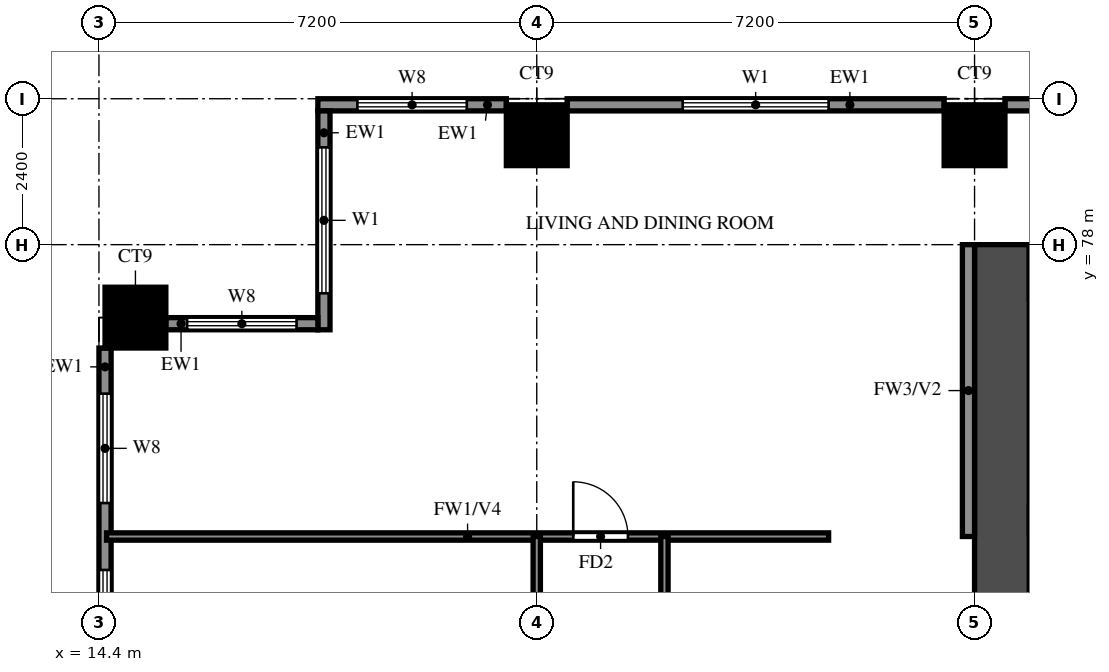
"""IFC4 building model, lengths in metres.
Left out: names, types, materials, properties, quantities, classifications, styles, units other than length and angle.
Written with IfcOpenShell. Run it as: python <this file> out.ifc"""

import sys

from ifc_helpers import new_model, si_unit, direction, frame, frame_2d, origin, origin_2d, place, context, subcontext, project, spatial, rectangle, extrude, source, transform, mapped, element, fill, save


model = new_model("IFC4")
c1 = context("Model", 3, precision=1e-05, world=origin(), true_north=direction((0.0, 1.0)))
c2 = subcontext(c1, "Body", "Model", "MODEL_VIEW")
j1 = project(units=[si_unit("LENGTHUNIT", "METRE"), si_unit("PLANEANGLEUNIT", "RADIAN")], contexts=[c1])
p1 = place(None, origin())
s1 = spatial("IfcSite", under=j1, at=p1, CompositionType="ELEMENT")
p2 = place(p1, origin())
s2 = spatial("IfcBuilding", under=s1, at=p2, CompositionType="ELEMENT")
p3 = place(p2, frame((0.0, 0.0, 90.0)))
s3 = spatial("IfcBuildingStorey", under=s2, at=p3, CompositionType="ELEMENT", Elevation=90.0)
m1 = source(origin(), c2, "Body", "SweptSolid", [
    extrude(rectangle(XDim=1.0, YDim=1.0, at=origin_2d()), origin(), (0.0, 0.0, 1.0), 3.18),
])
for number, where, z_axis, x_axis in (
    (1, (15.0, 76.8, 0.0), (0.0, 0.0, 1.0), (1.0, 0.0, 0.0)),
    (2, (21.6, 79.8, 0.0), (0.0, 0.0, 1.0), (1.0, 0.0, 0.0)),
    (3, (28.8, 79.8, 0.0), (0.0, 0.0, 1.0), (1.0, 0.0, 0.0)),
):
    element("IfcColumn", number, at=place(p3, frame(where, z_axis=z_axis, x_axis=x_axis)), inside=s3, PredefinedType="COLUMN", context=c2, shape_type="MappedRepresentation", body=[
        mapped(m1, transform((0.0, 0.0, 0.0))),
    ])
p4 = place(p3, frame((29.25, 66.0, 0.0), z_axis=(0.0, 0.0, 1.0), x_axis=(0.0, 1.0, 0.0)))
e4 = element("IfcWall", 4, at=p4, inside=s3, PredefinedType="SHEAR", context=c2, shape_type="SweptSolid", body=[
    extrude(rectangle(XDim=12.0, YDim=0.9, at=frame_2d((6.0, 0.0))), origin(), (0.0, 0.0, 1.0), 3.18),
])
p5 = place(p3, frame((29.7, 73.475, 0.0), z_axis=(0.0, 0.0, 1.0), x_axis=(1.0, 0.0, 0.0)))
e5 = element("IfcWall", 5, at=p5, inside=s3, PredefinedType="SHEAR", context=c2, shape_type="SweptSolid", body=[
    extrude(rectangle(XDim=3.175, YDim=0.45, at=frame_2d((1.587, 0.0))), origin(), (0.0, 0.0, 1.0), 3.18),
])
p6 = place(p3, frame((35.5, 80.3, 0.0), z_axis=(0.0, 0.0, 1.0), x_axis=(-1.0, 0.0, 0.0)))
e6 = element("IfcWall", 6, at=p6, inside=s3, PredefinedType="SOLIDWALL", context=c2, shape_type="SweptSolid", body=[
    extrude(rectangle(XDim=6.2, YDim=0.2, at=frame_2d((3.1, 0.0))), origin(), (0.0, 0.0, 1.0), 3.18),
])
p7 = place(p3, frame((28.3, 80.3, 0.0), z_axis=(0.0, 0.0, 1.0), x_axis=(-1.0, 0.0, 0.0)))
e7 = element("IfcWall", 7, at=p7, inside=s3, PredefinedType="SOLIDWALL", context=c2, shape_type="SweptSolid", body=[
    extrude(rectangle(XDim=6.2, YDim=0.2, at=frame_2d((3.1, 0.0))), origin(), (0.0, 0.0, 1.0), 3.18),
])
p8 = place(p7, frame((1.9, 0.0, 0.6)))
e8 = element("IfcOpeningElement", 8, at=p8, cuts=e7, PredefinedType="OPENING", context=c2, shape_type="SweptSolid", body=[
    extrude(rectangle(XDim=2.4, YDim=2.4, at=frame_2d((1.2, 1.2))), frame((0.0, 0.11, 0.0), z_axis=(0.0, -1.0, 0.0), x_axis=(1.0, 0.0, 0.0)), (0.0, 0.0, 1.0), 0.22),
])
p9 = place(p3, frame((21.1, 80.3, 0.0), z_axis=(0.0, 0.0, 1.0), x_axis=(-1.0, 0.0, 0.0)))
e9 = element("IfcWall", 9, at=p9, inside=s3, PredefinedType="SOLIDWALL", context=c2, shape_type="SweptSolid", body=[
    extrude(rectangle(XDim=3.1, YDim=0.2, at=frame_2d((1.55, 0.0))), origin(), (0.0, 0.0, 1.0), 3.18),
])
p10 = place(p9, frame((0.65, 0.0, 0.6)))
e10 = element("IfcOpeningElement", 10, at=p10, cuts=e9, PredefinedType="OPENING", context=c2, shape_type="SweptSolid", body=[
    extrude(rectangle(XDim=1.8, YDim=2.4, at=frame_2d((0.9, 1.2))), frame((0.0, 0.11, 0.0), z_axis=(0.0, -1.0, 0.0), x_axis=(1.0, 0.0, 0.0)), (0.0, 0.0, 1.0), 0.22),
])
p11 = place(p3, frame((18.1, 80.2, 0.0), z_axis=(0.0, 0.0, 1.0), x_axis=(0.0, -1.0, 0.0)))
e11 = element("IfcWall", 11, at=p11, inside=s3, PredefinedType="SOLIDWALL", context=c2, shape_type="SweptSolid", body=[
    extrude(rectangle(XDim=3.6, YDim=0.2, at=frame_2d((1.8, 0.0))), origin(), (0.0, 0.0, 1.0), 3.18),
])
p12 = place(p11, frame((0.6, 0.0, 0.6)))
e12 = element("IfcOpeningElement", 12, at=p12, cuts=e11, PredefinedType="OPENING", context=c2, shape_type="SweptSolid", body=[
    extrude(rectangle(XDim=2.4, YDim=2.4, at=frame_2d((1.2, 1.2))), frame((0.0, 0.11, 0.0), z_axis=(0.0, -1.0, 0.0), x_axis=(1.0, 0.0, 0.0)), (0.0, 0.0, 1.0), 0.22),
])
p13 = place(p3, frame((18.0, 76.7, 0.0), z_axis=(0.0, 0.0, 1.0), x_axis=(-1.0, 0.0, 0.0)))
e13 = element("IfcWall", 13, at=p13, inside=s3, PredefinedType="SOLIDWALL", context=c2, shape_type="SweptSolid", body=[
    extrude(rectangle(XDim=2.5, YDim=0.2, at=frame_2d((1.25, 0.0))), origin(), (0.0, 0.0, 1.0), 3.18),
])
p14 = place(p13, frame((0.35, 0.0, 0.6)))
e14 = element("IfcOpeningElement", 14, at=p14, cuts=e13, PredefinedType="OPENING", context=c2, shape_type="SweptSolid", body=[
    extrude(rectangle(XDim=1.8, YDim=2.4, at=frame_2d((0.9, 1.2))), frame((0.0, 0.11, 0.0), z_axis=(0.0, -1.0, 0.0), x_axis=(1.0, 0.0, 0.0)), (0.0, 0.0, 1.0), 0.22),
])
p15 = place(p3, frame((14.5, 76.3, 0.0), z_axis=(0.0, 0.0, 1.0), x_axis=(0.0, -1.0, 0.0)))
e15 = element("IfcWall", 15, at=p15, inside=s3, PredefinedType="SOLIDWALL", context=c2, shape_type="SweptSolid", body=[
    extrude(rectangle(XDim=6.2, YDim=0.2, at=frame_2d((3.1, 0.0))), origin(), (0.0, 0.0, 1.0), 3.18),
])
p16 = place(p15, frame((3.65, 0.0, 0.6)))
e16 = element("IfcOpeningElement", 16, at=p16, cuts=e15, PredefinedType="OPENING", context=c2, shape_type="SweptSolid", body=[
    extrude(rectangle(XDim=1.8, YDim=2.4, at=frame_2d((0.9, 1.2))), frame((0.0, 0.11, 0.0), z_axis=(0.0, -1.0, 0.0), x_axis=(1.0, 0.0, 0.0)), (0.0, 0.0, 1.0), 0.22),
])
p17 = place(p15, frame((0.75, 0.0, 0.6)))
e17 = element("IfcOpeningElement", 17, at=p17, cuts=e15, PredefinedType="OPENING", context=c2, shape_type="SweptSolid", body=[
    extrude(rectangle(XDim=1.8, YDim=2.4, at=frame_2d((0.9, 1.2))), frame((0.0, 0.11, 0.0), z_axis=(0.0, -1.0, 0.0), x_axis=(1.0, 0.0, 0.0)), (0.0, 0.0, 1.0), 0.22),
])
p18 = place(p3, frame((28.7, 73.2, 0.0), z_axis=(0.0, 0.0, 1.0), x_axis=(0.0, 1.0, 0.0)))
e18 = element("IfcWall", 18, at=p18, inside=s3, PredefinedType="SOLIDWALL", context=c2, shape_type="SweptSolid", body=[
    extrude(rectangle(XDim=4.8, YDim=0.2, at=frame_2d((2.4, 0.0))), origin(), (0.0, 0.0, 1.0), 3.18),
])
p19 = place(p3, frame((14.525, 73.2, 0.0), z_axis=(0.0, 0.0, 1.0), x_axis=(1.0, 0.0, 0.0)))
e19 = element("IfcWall", 19, at=p19, inside=s3, PredefinedType="PARTITIONING", context=c2, shape_type="SweptSolid", body=[
    extrude(rectangle(XDim=11.875, YDim=0.12, at=frame_2d((5.938, 0.0))), origin(), (0.0, 0.0, 1.0), 2.28),
])
p20 = place(p19, frame((7.675, 0.0, 0.0)))
e20 = element("IfcOpeningElement", 20, at=p20, cuts=e19, PredefinedType="OPENING", context=c2, shape_type="SweptSolid", body=[
    extrude(rectangle(XDim=0.9, YDim=2.1, at=frame_2d((0.45, 1.05))), frame((0.0, 0.07, 0.0), z_axis=(0.0, -1.0, 0.0), x_axis=(1.0, 0.0, 0.0)), (0.0, 0.0, 1.0), 0.14),
])
p21 = place(p3, frame((21.6, 69.6, 0.0), z_axis=(0.0, 0.0, 1.0), x_axis=(0.0, 1.0, 0.0)))
e21 = element("IfcWall", 21, at=p21, inside=s3, PredefinedType="PARTITIONING", context=c2, shape_type="SweptSolid", body=[
    extrude(rectangle(XDim=3.6, YDim=0.12, at=frame_2d((1.8, 0.0))), origin(), (0.0, 0.0, 1.0), 3.18),
])
p22 = place(p21, frame((1.35, 0.0, 0.0)))
e22 = element("IfcOpeningElement", 22, at=p22, cuts=e21, PredefinedType="OPENING", context=c2, shape_type="SweptSolid", body=[
    extrude(rectangle(XDim=0.9, YDim=2.1, at=frame_2d((0.45, 1.05))), frame((0.0, 0.07, 0.0), z_axis=(0.0, -1.0, 0.0), x_axis=(1.0, 0.0, 0.0)), (0.0, 0.0, 1.0), 0.14),
])
p23 = place(p3, frame((23.7, 64.8, 0.0), z_axis=(0.0, 0.0, 1.0), x_axis=(0.0, 1.0, 0.0)))
e23 = element("IfcWall", 23, at=p23, inside=s3, PredefinedType="PARTITIONING", context=c2, shape_type="SweptSolid", body=[
    extrude(rectangle(XDim=8.4, YDim=0.12, at=frame_2d((4.2, 0.0))), origin(), (0.0, 0.0, 1.0), 3.18),
])
p24 = place(p23, frame((1.875, 0.0, 0.0)))
e24 = element("IfcOpeningElement", 24, at=p24, cuts=e23, PredefinedType="OPENING", context=c2, shape_type="SweptSolid", body=[
    extrude(rectangle(XDim=0.9, YDim=2.1, at=frame_2d((0.45, 1.05))), frame((0.0, 0.07, 0.0), z_axis=(0.0, -1.0, 0.0), x_axis=(1.0, 0.0, 0.0)), (0.0, 0.0, 1.0), 0.14),
])
p25 = place(p23, frame((6.075, 0.0, 0.0)))
e25 = element("IfcOpeningElement", 25, at=p25, cuts=e23, PredefinedType="OPENING", context=c2, shape_type="SweptSolid", body=[
    extrude(rectangle(XDim=0.9, YDim=2.1, at=frame_2d((0.45, 1.05))), frame((0.0, 0.07, 0.0), z_axis=(0.0, -1.0, 0.0), x_axis=(1.0, 0.0, 0.0)), (0.0, 0.0, 1.0), 0.14),
])
p26 = place(p8, origin())
e26 = element("IfcWindow", 26, at=p26, inside=s3, PartitioningType="DOUBLE_PANEL_VERTICAL", PredefinedType="WINDOW", context=c2, shape_type="SweptSolid", body=[
    extrude(rectangle(XDim=2.4, YDim=2.4, at=frame_2d((1.2, 1.2))), frame((0.0, 0.03, 0.0), z_axis=(0.0, -1.0, 0.0), x_axis=(1.0, 0.0, 0.0)), (0.0, 0.0, 1.0), 0.06),
])
fill(e8, e26)
p27 = place(p10, origin())
e27 = element("IfcWindow", 27, at=p27, inside=s3, PartitioningType="DOUBLE_PANEL_VERTICAL", PredefinedType="WINDOW", context=c2, shape_type="SweptSolid", body=[
    extrude(rectangle(XDim=1.8, YDim=2.4, at=frame_2d((0.9, 1.2))), frame((0.0, 0.03, 0.0), z_axis=(0.0, -1.0, 0.0), x_axis=(1.0, 0.0, 0.0)), (0.0, 0.0, 1.0), 0.06),
])
fill(e10, e27)
p28 = place(p12, origin())
e28 = element("IfcWindow", 28, at=p28, inside=s3, PartitioningType="DOUBLE_PANEL_VERTICAL", PredefinedType="WINDOW", context=c2, shape_type="SweptSolid", body=[
    extrude(rectangle(XDim=2.4, YDim=2.4, at=frame_2d((1.2, 1.2))), frame((0.0, 0.03, 0.0), z_axis=(0.0, -1.0, 0.0), x_axis=(1.0, 0.0, 0.0)), (0.0, 0.0, 1.0), 0.06),
])
fill(e12, e28)
p29 = place(p14, origin())
e29 = element("IfcWindow", 29, at=p29, inside=s3, PartitioningType="DOUBLE_PANEL_VERTICAL", PredefinedType="WINDOW", context=c2, shape_type="SweptSolid", body=[
    extrude(rectangle(XDim=1.8, YDim=2.4, at=frame_2d((0.9, 1.2))), frame((0.0, 0.03, 0.0), z_axis=(0.0, -1.0, 0.0), x_axis=(1.0, 0.0, 0.0)), (0.0, 0.0, 1.0), 0.06),
])
fill(e14, e29)
p30 = place(p16, origin())
e30 = element("IfcWindow", 30, at=p30, inside=s3, PartitioningType="DOUBLE_PANEL_VERTICAL", PredefinedType="WINDOW", context=c2, shape_type="SweptSolid", body=[
    extrude(rectangle(XDim=1.8, YDim=2.4, at=frame_2d((0.9, 1.2))), frame((0.0, 0.03, 0.0), z_axis=(0.0, -1.0, 0.0), x_axis=(1.0, 0.0, 0.0)), (0.0, 0.0, 1.0), 0.06),
])
fill(e16, e30)
p31 = place(p17, origin())
e31 = element("IfcWindow", 31, at=p31, inside=s3, PartitioningType="DOUBLE_PANEL_VERTICAL", PredefinedType="WINDOW", context=c2, shape_type="SweptSolid", body=[
    extrude(rectangle(XDim=1.8, YDim=2.4, at=frame_2d((0.9, 1.2))), frame((0.0, 0.03, 0.0), z_axis=(0.0, -1.0, 0.0), x_axis=(1.0, 0.0, 0.0)), (0.0, 0.0, 1.0), 0.06),
])
fill(e17, e31)
p32 = place(p20, origin())
e32 = element("IfcDoor", 32, at=p32, inside=s3, OperationType="SINGLE_SWING_LEFT", PredefinedType="DOOR", context=c2, shape_type="SweptSolid", body=[
    extrude(rectangle(XDim=0.9, YDim=2.1, at=frame_2d((0.45, 1.05))), frame((0.0, 0.025, 0.0), z_axis=(0.0, -1.0, 0.0), x_axis=(1.0, 0.0, 0.0)), (0.0, 0.0, 1.0), 0.05),
])
fill(e20, e32)
save(model, sys.argv[1])
